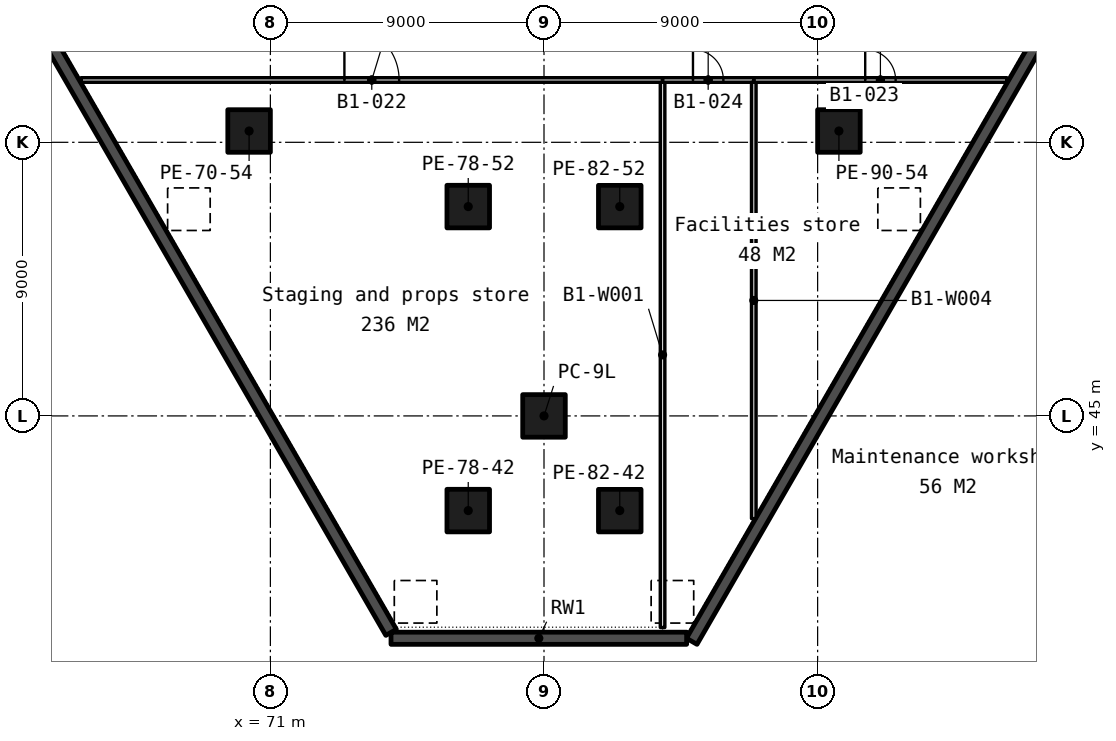
"""IFC4 building model, lengths in metres.
Left out: names, types, materials, properties, quantities, classifications, styles, units other than length and angle.
Written with IfcOpenShell. Run it as: python <this file> out.ifc"""

import sys

from ifc_helpers import new_model, si_unit, direction, frame, frame_2d, origin, origin_2d, place, context, subcontext, project, spatial, rectangle, extrude, element, fill, save


model = new_model("IFC4")
c1 = context("Model", 3, precision=1e-05, world=origin(), true_north=direction((0.0, 1.0)))
c2 = subcontext(c1, "Body", "Model", "MODEL_VIEW")
j1 = project(units=[si_unit("LENGTHUNIT", "METRE"), si_unit("PLANEANGLEUNIT", "RADIAN")], contexts=[c1])
p1 = place(None, origin())
s1 = spatial("IfcSite", under=j1, at=p1, CompositionType="ELEMENT")
p2 = place(p1, origin())
s2 = spatial("IfcBuilding", under=s1, at=p2, CompositionType="ELEMENT")
p3 = place(p2, frame((0.0, 0.0, -4.5)))
s3 = spatial("IfcBuildingStorey", under=s2, at=p3, CompositionType="ELEMENT", Elevation=-4.5)
p4 = place(p3, frame((137.688, 129.089, -0.25), z_axis=(0.0, 0.0, 1.0), x_axis=(-0.499999742059, -0.866025552707, 0.0)))
e1 = element("IfcWall", 1, at=p4, inside=s3, PredefinedType="SOLIDWALL", context=c2, shape_type="SweptSolid", body=[
    extrude(rectangle(XDim=105.659, YDim=0.4, at=frame_2d((52.829, 0.0))), origin(), (0.0, 0.0, 1.0), 4.45),
])
p5 = place(p3, frame((84.692, 37.686, -0.25), z_axis=(0.0, 0.0, 1.0), x_axis=(-1.0, 0.0, 0.0)))
e2 = element("IfcWall", 2, at=p5, inside=s3, PredefinedType="SOLIDWALL", context=c2, shape_type="SweptSolid", body=[
    extrude(rectangle(XDim=9.724, YDim=0.4, at=frame_2d((4.862, 0.0))), origin(), (0.0, 0.0, 1.0), 4.45),
])
p6 = place(p3, frame((74.971, 37.881, -0.25), z_axis=(0.0, 0.0, 1.0), x_axis=(-0.499999742059, 0.866025552707, 0.0)))
e3 = element("IfcWall", 3, at=p6, inside=s3, PredefinedType="SOLIDWALL", context=c2, shape_type="SweptSolid", body=[
    extrude(rectangle(XDim=105.659, YDim=0.4, at=frame_2d((52.829, 0.0))), origin(), (0.0, 0.0, 1.0), 4.45),
])
for number, where, z_axis, x_axis in (
    (4, (80.0, 45.0, 0.0), (0.0, 0.0, 1.0), (1.0, 0.0, 0.0)),
    (5, (70.3, 54.372, 0.0), (0.0, 0.0, 1.0), (1.0, 0.0, 0.0)),
    (6, (77.508, 41.886, 0.0), (0.0, 0.0, 1.0), (1.0, 0.0, 0.0)),
    (7, (77.508, 51.886, 0.0), (0.0, 0.0, 1.0), (1.0, 0.0, 0.0)),
    (8, (82.492, 41.886, 0.0), (0.0, 0.0, 1.0), (1.0, 0.0, 0.0)),
    (9, (82.492, 51.886, 0.0), (0.0, 0.0, 1.0), (1.0, 0.0, 0.0)),
    (10, (89.7, 54.372, 0.0), (0.0, 0.0, 1.0), (1.0, 0.0, 0.0)),
):
    element("IfcColumn", number, at=place(p3, frame(where, z_axis=z_axis, x_axis=x_axis)), inside=s3, PredefinedType="COLUMN", context=c2, shape_type="SweptSolid", body=[
        extrude(rectangle(XDim=1.4, YDim=1.4, at=origin_2d()), origin(), (0.0, 0.0, 1.0), 4.5),
    ])
p7 = place(p3, frame((83.9, 38.04, 0.0), z_axis=(0.0, 0.0, 1.0), x_axis=(0.0, 1.0, 0.0)))
e11 = element("IfcWall", 11, at=p7, inside=s3, PredefinedType="PARTITIONING", context=c2, shape_type="SweptSolid", body=[
    extrude(rectangle(XDim=17.935, YDim=0.15, at=frame_2d((8.968, 0.0))), origin(), (0.0, 0.0, 1.0), 4.2),
])
p8 = place(p3, frame((64.77, 56.05, 0.0), z_axis=(0.0, 0.0, 1.0), x_axis=(1.0, 0.0, 0.0)))
e12 = element("IfcWall", 12, at=p8, inside=s3, PredefinedType="PARTITIONING", context=c2, shape_type="SweptSolid", body=[
    extrude(rectangle(XDim=19.13, YDim=0.15, at=frame_2d((9.565, 0.0))), origin(), (0.0, 0.0, 1.0), 4.2),
])
p9 = place(p8, frame((8.665, 0.0, 0.0)))
e13 = element("IfcOpeningElement", 13, at=p9, cuts=e12, PredefinedType="OPENING", context=c2, shape_type="SweptSolid", body=[
    extrude(rectangle(XDim=1.8, YDim=2.1, at=frame_2d((0.9, 1.05))), frame((0.0, 0.085, 0.0), z_axis=(0.0, -1.0, 0.0), x_axis=(1.0, 0.0, 0.0)), (0.0, 0.0, 1.0), 0.17),
])
p10 = place(p3, frame((83.9, 56.05, 0.0), z_axis=(0.0, 0.0, 1.0), x_axis=(1.0, 0.0, 0.0)))
e14 = element("IfcWall", 14, at=p10, inside=s3, PredefinedType="PARTITIONING", context=c2, shape_type="SweptSolid", body=[
    extrude(rectangle(XDim=3.0, YDim=0.15, at=frame_2d((1.5, 0.0))), origin(), (0.0, 0.0, 1.0), 4.2),
])
p11 = place(p10, frame((1.0, 0.0, 0.0)))
e15 = element("IfcOpeningElement", 15, at=p11, cuts=e14, PredefinedType="OPENING", context=c2, shape_type="SweptSolid", body=[
    extrude(rectangle(XDim=1.0, YDim=2.1, at=frame_2d((0.5, 1.05))), frame((0.0, 0.085, 0.0), z_axis=(0.0, -1.0, 0.0), x_axis=(1.0, 0.0, 0.0)), (0.0, 0.0, 1.0), 0.17),
])
p12 = place(p3, frame((86.9, 41.622, 0.0), z_axis=(0.0, 0.0, 1.0), x_axis=(0.0, 1.0, 0.0)))
e16 = element("IfcWall", 16, at=p12, inside=s3, PredefinedType="PARTITIONING", context=c2, shape_type="SweptSolid", body=[
    extrude(rectangle(XDim=14.354, YDim=0.15, at=frame_2d((7.177, 0.0))), origin(), (0.0, 0.0, 1.0), 4.2),
])
p13 = place(p3, frame((86.9, 56.05, 0.0), z_axis=(0.0, 0.0, 1.0), x_axis=(1.0, 0.0, 0.0)))
e17 = element("IfcWall", 17, at=p13, inside=s3, PredefinedType="PARTITIONING", context=c2, shape_type="SweptSolid", body=[
    extrude(rectangle(XDim=8.33, YDim=0.15, at=frame_2d((4.165, 0.0))), origin(), (0.0, 0.0, 1.0), 4.2),
])
p14 = place(p13, frame((3.665, 0.0, 0.0)))
e18 = element("IfcOpeningElement", 18, at=p14, cuts=e17, PredefinedType="OPENING", context=c2, shape_type="SweptSolid", body=[
    extrude(rectangle(XDim=1.0, YDim=2.1, at=frame_2d((0.5, 1.05))), frame((0.0, 0.085, 0.0), z_axis=(0.0, -1.0, 0.0), x_axis=(1.0, 0.0, 0.0)), (0.0, 0.0, 1.0), 0.17),
])
p15 = place(p9, origin())
e19 = element("IfcDoor", 19, at=p15, inside=s3, OperationType="SINGLE_SWING_LEFT", PredefinedType="DOOR", context=c2, shape_type="SweptSolid", body=[
    extrude(rectangle(XDim=1.8, YDim=2.1, at=frame_2d((0.9, 1.05))), frame((0.0, 0.025, 0.0), z_axis=(0.0, -1.0, 0.0), x_axis=(1.0, 0.0, 0.0)), (0.0, 0.0, 1.0), 0.05),
])
fill(e13, e19)
p16 = place(p14, origin())
e20 = element("IfcDoor", 20, at=p16, inside=s3, OperationType="SINGLE_SWING_LEFT", PredefinedType="DOOR", context=c2, shape_type="SweptSolid", body=[
    extrude(rectangle(XDim=1.0, YDim=2.1, at=frame_2d((0.5, 1.05))), frame((0.0, 0.025, 0.0), z_axis=(0.0, -1.0, 0.0), x_axis=(1.0, 0.0, 0.0)), (0.0, 0.0, 1.0), 0.05),
])
fill(e18, e20)
p17 = place(p11, origin())
e21 = element("IfcDoor", 21, at=p17, inside=s3, OperationType="SINGLE_SWING_LEFT", PredefinedType="DOOR", context=c2, shape_type="SweptSolid", body=[
    extrude(rectangle(XDim=1.0, YDim=2.1, at=frame_2d((0.5, 1.05))), frame((0.0, 0.025, 0.0), z_axis=(0.0, -1.0, 0.0), x_axis=(1.0, 0.0, 0.0)), (0.0, 0.0, 1.0), 0.05),
])
fill(e15, e21)
save(model, sys.argv[1])
